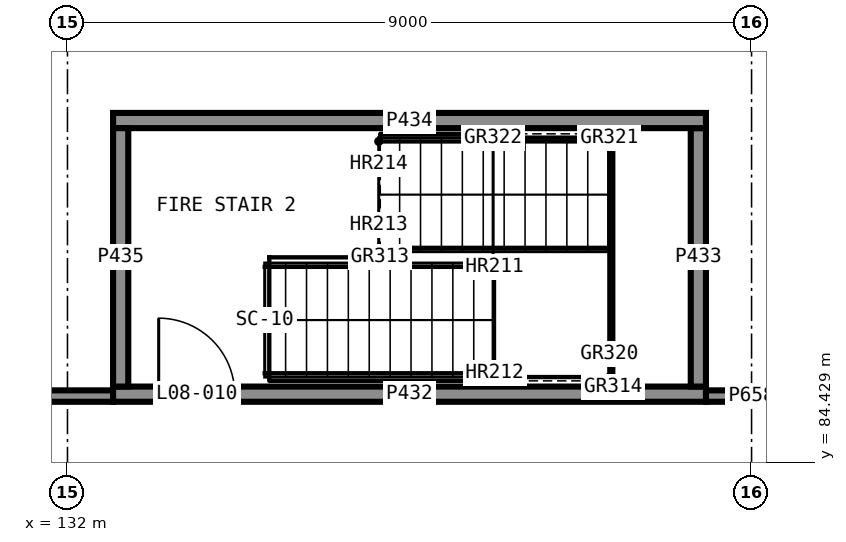
"""IFC4 building model, lengths in metres.
Left out: names, types, materials, properties, quantities, classifications, styles, units other than length and angle.
Written with IfcOpenShell. Run it as: python <this file> out.ifc"""

import sys

from ifc_helpers import new_model, si_unit, direction, frame, frame_2d, origin, place, context, subcontext, project, spatial, rectangle, extrude, element, fill, save


model = new_model("IFC4")
c1 = context("Model", 3, precision=1e-05, world=origin(), true_north=direction((0.0, 1.0)))
c2 = subcontext(c1, "Body", "Model", "MODEL_VIEW")
j1 = project(units=[si_unit("LENGTHUNIT", "METRE"), si_unit("PLANEANGLEUNIT", "RADIAN")], contexts=[c1])
p1 = place(None, origin())
s1 = spatial("IfcSite", under=j1, at=p1, CompositionType="ELEMENT")
p2 = place(p1, origin())
s2 = spatial("IfcBuilding", under=s1, at=p2, CompositionType="ELEMENT")
p3 = place(p2, frame((0.0, 0.0, 33.5)))
s3 = spatial("IfcBuildingStorey", under=s2, at=p3, CompositionType="ELEMENT", Elevation=33.5)
p4 = place(p3, frame((132.6, 85.325, 0.0), z_axis=(0.0, 0.0, 1.0), x_axis=(1.0, 0.0, 0.0)))
e1 = element("IfcWall", 1, at=p4, inside=s3, PredefinedType="SHEAR", context=c2, shape_type="SweptSolid", body=[
    extrude(rectangle(XDim=7.8, YDim=0.2, at=frame_2d((3.9, 0.0))), origin(), (0.0, 0.0, 1.0), 3.75),
])
p5 = place(p4, frame((0.6, 0.0, 0.0)))
e2 = element("IfcOpeningElement", 2, at=p5, cuts=e1, PredefinedType="OPENING", context=c2, shape_type="SweptSolid", body=[
    extrude(rectangle(XDim=1.0, YDim=2.1, at=frame_2d((0.5, 1.05))), frame((0.0, 0.11, 0.0), z_axis=(0.0, -1.0, 0.0), x_axis=(1.0, 0.0, 0.0)), (0.0, 0.0, 1.0), 0.22),
])
p6 = place(p3, frame((140.3, 85.425, 0.0), z_axis=(0.0, 0.0, 1.0), x_axis=(0.0, 1.0, 0.0)))
e3 = element("IfcWall", 3, at=p6, inside=s3, PredefinedType="SHEAR", context=c2, shape_type="SweptSolid", body=[
    extrude(rectangle(XDim=3.4, YDim=0.2, at=frame_2d((1.7, 0.0))), origin(), (0.0, 0.0, 1.0), 3.75),
])
p7 = place(p3, frame((140.4, 88.925, 0.0), z_axis=(0.0, 0.0, 1.0), x_axis=(-1.0, 0.0, 0.0)))
e4 = element("IfcWall", 4, at=p7, inside=s3, PredefinedType="SHEAR", context=c2, shape_type="SweptSolid", body=[
    extrude(rectangle(XDim=7.8, YDim=0.2, at=frame_2d((3.9, 0.0))), origin(), (0.0, 0.0, 1.0), 3.75),
])
p8 = place(p3, frame((132.7, 88.825, 0.0), z_axis=(0.0, 0.0, 1.0), x_axis=(0.0, -1.0, 0.0)))
e5 = element("IfcWall", 5, at=p8, inside=s3, PredefinedType="SHEAR", context=c2, shape_type="SweptSolid", body=[
    extrude(rectangle(XDim=3.4, YDim=0.2, at=frame_2d((1.7, 0.0))), origin(), (0.0, 0.0, 1.0), 3.75),
])
p9 = place(p3, frame((122.7, 85.3, 0.0), z_axis=(0.0, 0.0, 1.0), x_axis=(1.0, 0.0, 0.0)))
e6 = element("IfcWall", 6, at=p9, inside=s3, PredefinedType="PARTITIONING", context=c2, shape_type="SweptSolid", body=[
    extrude(rectangle(XDim=9.9, YDim=0.15, at=frame_2d((4.95, 0.0))), origin(), (0.0, 0.0, 1.0), 3.75),
])
p10 = place(p9, frame((2.8, 0.0, 0.0)))
e7 = element("IfcOpeningElement", 7, at=p10, cuts=e6, PredefinedType="OPENING", context=c2, shape_type="SweptSolid", body=[
    extrude(rectangle(XDim=1.0, YDim=2.1, at=frame_2d((0.5, 1.05))), frame((0.0, 0.085, 0.0), z_axis=(0.0, -1.0, 0.0), x_axis=(1.0, 0.0, 0.0)), (0.0, 0.0, 1.0), 0.17),
])
p11 = place(p3, frame((140.4, 85.3, 0.0), z_axis=(0.0, 0.0, 1.0), x_axis=(1.0, 0.0, 0.0)))
e8 = element("IfcWall", 8, at=p11, inside=s3, PredefinedType="PARTITIONING", context=c2, shape_type="SweptSolid", body=[
    extrude(rectangle(XDim=1.2, YDim=0.15, at=frame_2d((0.6, 0.0))), origin(), (0.0, 0.0, 1.0), 3.75),
])
p12 = place(p5, origin())
e9 = element("IfcDoor", 9, at=p12, inside=s3, OperationType="SINGLE_SWING_RIGHT", PredefinedType="DOOR", context=c2, shape_type="SweptSolid", body=[
    extrude(rectangle(XDim=1.0, YDim=2.1, at=frame_2d((0.5, 1.05))), frame((0.0, 0.025, 0.0), z_axis=(0.0, -1.0, 0.0), x_axis=(1.0, 0.0, 0.0)), (0.0, 0.0, 1.0), 0.05),
])
fill(e2, e9)
save(model, sys.argv[1])
